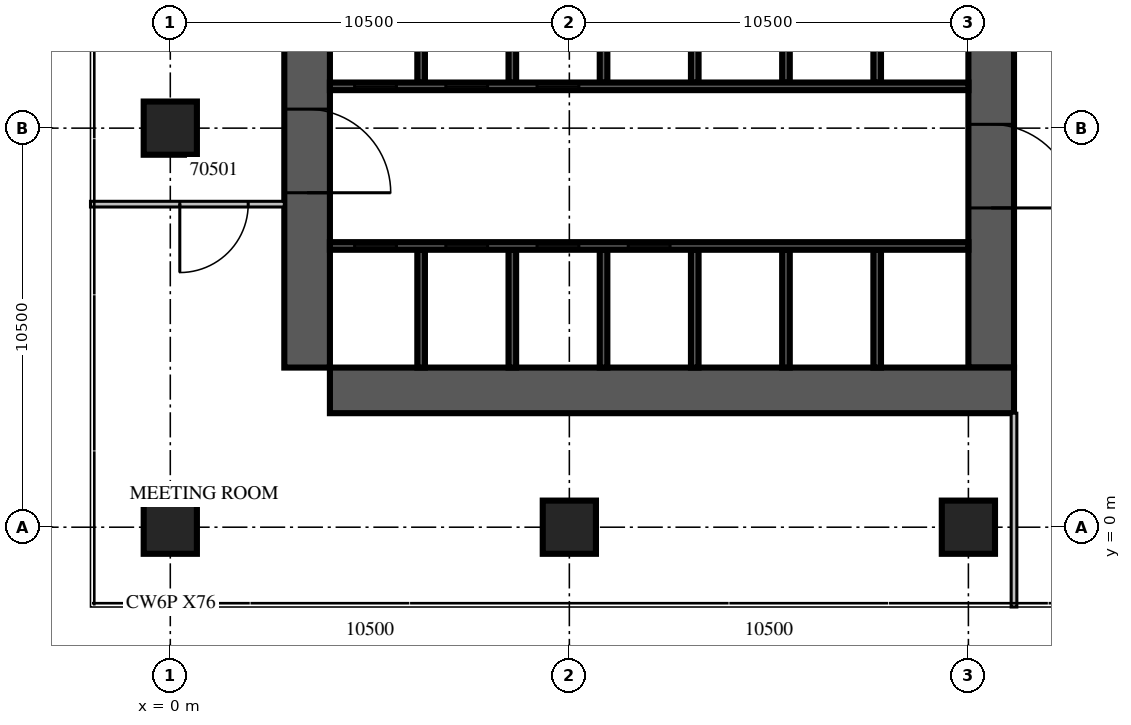
"""IFC4 building model, lengths in metres.
Left out: names, types, materials, properties, quantities, classifications, styles, units other than length and angle.
Written with IfcOpenShell. Run it as: python <this file> out.ifc"""

import sys

from ifc_helpers import new_model, si_unit, direction, frame, frame_2d, origin, origin_2d, place, context, subcontext, project, spatial, rectangle, extrude, source, transform, mapped, element, fill, save


model = new_model("IFC4")
c1 = context("Model", 3, precision=1e-05, world=origin(), true_north=direction((0.0, 1.0)))
c2 = subcontext(c1, "Body", "Model", "MODEL_VIEW")
j1 = project(units=[si_unit("LENGTHUNIT", "METRE"), si_unit("PLANEANGLEUNIT", "RADIAN")], contexts=[c1])
p1 = place(None, origin())
s1 = spatial("IfcSite", under=j1, at=p1, CompositionType="ELEMENT")
p2 = place(p1, origin())
s2 = spatial("IfcBuilding", under=s1, at=p2, CompositionType="ELEMENT")
p3 = place(p2, frame((0.0, 0.0, 12.9)))
s3 = spatial("IfcBuildingStorey", under=s2, at=p3, CompositionType="ELEMENT", Elevation=12.9)
m1 = source(origin(), c2, "Body", "SweptSolid", [
    extrude(rectangle(XDim=1.4, YDim=1.4, at=origin_2d()), origin(), (0.0, 0.0, 1.0), 5.4),
])
for number, where, z_axis, x_axis in (
    (1, (0.0, 0.0, 0.0), (0.0, 0.0, 1.0), (1.0, 0.0, 0.0)),
    (2, (0.0, 10.5, 0.0), (0.0, 0.0, 1.0), (1.0, 0.0, 0.0)),
    (3, (10.5, 0.0, 0.0), (0.0, 0.0, 1.0), (1.0, 0.0, 0.0)),
    (4, (21.0, 0.0, 0.0), (0.0, 0.0, 1.0), (1.0, 0.0, 0.0)),
):
    element("IfcColumn", number, at=place(p3, frame(where, z_axis=z_axis, x_axis=x_axis)), inside=s3, PredefinedType="COLUMN", context=c2, shape_type="MappedRepresentation", body=[
        mapped(m1, transform((0.0, 0.0, 0.0), scale=1.0)),
    ])
m2 = source(origin(), c2, "Body", "SweptSolid", [
    extrude(rectangle(XDim=18.0, YDim=1.2, at=frame_2d((9.0, 0.0))), origin(), (0.0, 0.0, 1.0), 5.4),
])
p4 = place(p3, frame((3.6, 4.2, 0.0), z_axis=(0.0, 0.0, 1.0), x_axis=(0.0, 1.0, 0.0)))
e5 = element("IfcWall", 5, at=p4, inside=s3, PredefinedType="SHEAR", context=c2, shape_type="MappedRepresentation", body=[
    mapped(m2, transform((0.0, 0.0, 0.0), scale=1.0)),
])
m3 = source(origin(), c2, "Body", "SweptSolid", [
    extrude(rectangle(XDim=2.2, YDim=2.1, at=frame_2d((1.1, 1.05))), frame((0.0, 0.61, 0.0), z_axis=(0.0, -1.0, 0.0), x_axis=(1.0, 0.0, 0.0)), (0.0, 0.0, 1.0), 1.22),
])
p5 = place(p4, frame((4.6, 0.0, 0.0)))
e6 = element("IfcOpeningElement", 6, at=p5, cuts=e5, PredefinedType="OPENING", context=c2, shape_type="MappedRepresentation", body=[
    mapped(m3, transform((0.0, 0.0, 0.0), scale=1.0)),
])
m4 = source(origin(), c2, "Body", "SweptSolid", [
    extrude(rectangle(XDim=16.8, YDim=1.2, at=frame_2d((8.4, 0.0))), origin(), (0.0, 0.0, 1.0), 5.4),
])
p6 = place(p3, frame((21.6, 4.2, 0.0), z_axis=(0.0, 0.0, 1.0), x_axis=(0.0, 1.0, 0.0)))
e7 = element("IfcWall", 7, at=p6, inside=s3, PredefinedType="SHEAR", context=c2, shape_type="MappedRepresentation", body=[
    mapped(m4, transform((0.0, 0.0, 0.0), scale=1.0)),
])
p7 = place(p6, frame((4.2, 0.0, 0.0)))
e8 = element("IfcOpeningElement", 8, at=p7, cuts=e7, PredefinedType="OPENING", context=c2, shape_type="MappedRepresentation", body=[
    mapped(m3, transform((0.0, 0.0, 0.0), scale=1.0)),
])
m5 = source(origin(), c2, "Body", "SweptSolid", [
    extrude(rectangle(XDim=1.2, YDim=2.1, at=frame_2d((0.6, 1.05))), frame((0.0, 0.61, 0.0), z_axis=(0.0, -1.0, 0.0), x_axis=(1.0, 0.0, 0.0)), (0.0, 0.0, 1.0), 1.22),
])
p8 = place(p6, frame((14.7, 0.0, 0.0)))
e9 = element("IfcOpeningElement", 9, at=p8, cuts=e7, PredefinedType="OPENING", context=c2, shape_type="MappedRepresentation", body=[
    mapped(m5, transform((0.0, 0.0, 0.0), scale=1.0)),
])
p9 = place(p3, frame((4.2, 3.6, 0.0), z_axis=(0.0, 0.0, 1.0), x_axis=(1.0, 0.0, 0.0)))
e10 = element("IfcWall", 10, at=p9, inside=s3, PredefinedType="SHEAR", context=c2, shape_type="MappedRepresentation", body=[
    mapped(m2, transform((0.0, 0.0, 0.0), scale=1.0)),
])
m6 = source(origin(), c2, "Body", "SweptSolid", [
    extrude(rectangle(XDim=3.1, YDim=0.2, at=frame_2d((1.55, 0.0))), origin(), (0.0, 0.0, 1.0), 5.4),
])
for number, where, z_axis, x_axis in (
    (11, (6.6, 4.2, 0.0), (0.0, 0.0, 1.0), (0.0, 1.0, 0.0)),
    (12, (9.0, 4.2, 0.0), (0.0, 0.0, 1.0), (0.0, 1.0, 0.0)),
    (13, (11.4, 4.2, 0.0), (0.0, 0.0, 1.0), (0.0, 1.0, 0.0)),
    (14, (13.8, 4.2, 0.0), (0.0, 0.0, 1.0), (0.0, 1.0, 0.0)),
    (15, (16.2, 4.2, 0.0), (0.0, 0.0, 1.0), (0.0, 1.0, 0.0)),
    (16, (18.6, 4.2, 0.0), (0.0, 0.0, 1.0), (0.0, 1.0, 0.0)),
):
    element("IfcWall", number, at=place(p3, frame(where, z_axis=z_axis, x_axis=x_axis)), inside=s3, PredefinedType="SOLIDWALL", context=c2, shape_type="MappedRepresentation", body=[
        mapped(m6, transform((0.0, 0.0, 0.0), scale=1.0)),
    ])
m7 = source(origin(), c2, "Body", "SweptSolid", [
    extrude(rectangle(XDim=3.0, YDim=0.2, at=frame_2d((1.5, 0.0))), origin(), (0.0, 0.0, 1.0), 5.4),
])
for number, where, z_axis, x_axis in (
    (17, (6.6, 11.7, 0.0), (0.0, 0.0, 1.0), (0.0, 1.0, 0.0)),
    (18, (9.0, 11.7, 0.0), (0.0, 0.0, 1.0), (0.0, 1.0, 0.0)),
    (19, (11.4, 11.7, 0.0), (0.0, 0.0, 1.0), (0.0, 1.0, 0.0)),
    (20, (13.8, 11.7, 0.0), (0.0, 0.0, 1.0), (0.0, 1.0, 0.0)),
    (21, (16.2, 11.7, 0.0), (0.0, 0.0, 1.0), (0.0, 1.0, 0.0)),
    (22, (18.6, 11.7, 0.0), (0.0, 0.0, 1.0), (0.0, 1.0, 0.0)),
):
    element("IfcWall", number, at=place(p3, frame(where, z_axis=z_axis, x_axis=x_axis)), inside=s3, PredefinedType="SOLIDWALL", context=c2, shape_type="MappedRepresentation", body=[
        mapped(m7, transform((0.0, 0.0, 0.0), scale=1.0)),
    ])
m8 = source(origin(), c2, "Body", "SweptSolid", [
    extrude(rectangle(XDim=16.8, YDim=0.2, at=frame_2d((8.4, 0.0))), origin(), (0.0, 0.0, 1.0), 5.4),
])
p10 = place(p3, frame((4.2, 7.4, 0.0), z_axis=(0.0, 0.0, 1.0), x_axis=(1.0, 0.0, 0.0)))
e23 = element("IfcWall", 23, at=p10, inside=s3, PredefinedType="SOLIDWALL", context=c2, shape_type="MappedRepresentation", body=[
    mapped(m8, transform((0.0, 0.0, 0.0), scale=1.0)),
])
m9 = source(origin(), c2, "Body", "SweptSolid", [
    extrude(rectangle(XDim=1.1, YDim=2.1, at=frame_2d((0.55, 1.05))), frame((0.0, 0.11, 0.0), z_axis=(0.0, -1.0, 0.0), x_axis=(1.0, 0.0, 0.0)), (0.0, 0.0, 1.0), 0.22),
])
p11 = place(p10, frame((0.65, 0.0, 0.0)))
e24 = element("IfcOpeningElement", 24, at=p11, cuts=e23, PredefinedType="OPENING", context=c2, shape_type="MappedRepresentation", body=[
    mapped(m9, transform((0.0, 0.0, 0.0), scale=1.0)),
])
p12 = place(p10, frame((3.05, 0.0, 0.0)))
e25 = element("IfcOpeningElement", 25, at=p12, cuts=e23, PredefinedType="OPENING", context=c2, shape_type="MappedRepresentation", body=[
    mapped(m9, transform((0.0, 0.0, 0.0), scale=1.0)),
])
p13 = place(p10, frame((5.45, 0.0, 0.0)))
e26 = element("IfcOpeningElement", 26, at=p13, cuts=e23, PredefinedType="OPENING", context=c2, shape_type="MappedRepresentation", body=[
    mapped(m9, transform((0.0, 0.0, 0.0), scale=1.0)),
])
p14 = place(p10, frame((7.85, 0.0, 0.0)))
e27 = element("IfcOpeningElement", 27, at=p14, cuts=e23, PredefinedType="OPENING", context=c2, shape_type="MappedRepresentation", body=[
    mapped(m9, transform((0.0, 0.0, 0.0), scale=1.0)),
])
p15 = place(p3, frame((4.2, 11.6, 0.0), z_axis=(0.0, 0.0, 1.0), x_axis=(1.0, 0.0, 0.0)))
e28 = element("IfcWall", 28, at=p15, inside=s3, PredefinedType="SOLIDWALL", context=c2, shape_type="MappedRepresentation", body=[
    mapped(m8, transform((0.0, 0.0, 0.0), scale=1.0)),
])
p16 = place(p15, frame((0.65, 0.0, 0.0)))
e29 = element("IfcOpeningElement", 29, at=p16, cuts=e28, PredefinedType="OPENING", context=c2, shape_type="MappedRepresentation", body=[
    mapped(m9, transform((0.0, 0.0, 0.0), scale=1.0)),
])
p17 = place(p15, frame((3.05, 0.0, 0.0)))
e30 = element("IfcOpeningElement", 30, at=p17, cuts=e28, PredefinedType="OPENING", context=c2, shape_type="MappedRepresentation", body=[
    mapped(m9, transform((0.0, 0.0, 0.0), scale=1.0)),
])
p18 = place(p15, frame((5.45, 0.0, 0.0)))
e31 = element("IfcOpeningElement", 31, at=p18, cuts=e28, PredefinedType="OPENING", context=c2, shape_type="MappedRepresentation", body=[
    mapped(m9, transform((0.0, 0.0, 0.0), scale=1.0)),
])
m10 = source(origin(), c2, "Body", "SweptSolid", [
    extrude(rectangle(XDim=5.1, YDim=0.15, at=frame_2d((2.55, 0.0))), origin(), (0.0, 0.0, 1.0), 4.8),
])
p19 = place(p3, frame((-2.1, 8.5, 0.0), z_axis=(0.0, 0.0, 1.0), x_axis=(1.0, 0.0, 0.0)))
e32 = element("IfcWall", 32, at=p19, inside=s3, PredefinedType="PARTITIONING", context=c2, shape_type="MappedRepresentation", body=[
    mapped(m10, transform((0.0, 0.0, 0.0), scale=1.0)),
])
m11 = source(origin(), c2, "Body", "SweptSolid", [
    extrude(rectangle(XDim=1.8, YDim=2.1, at=frame_2d((0.9, 1.05))), frame((0.0, 0.085, 0.0), z_axis=(0.0, -1.0, 0.0), x_axis=(1.0, 0.0, 0.0)), (0.0, 0.0, 1.0), 0.17),
])
p20 = place(p19, frame((2.35, 0.0, 0.0)))
e33 = element("IfcOpeningElement", 33, at=p20, cuts=e32, PredefinedType="OPENING", context=c2, shape_type="MappedRepresentation", body=[
    mapped(m11, transform((0.0, 0.0, 0.0), scale=1.0)),
])
p21 = place(p3, frame((22.2, -2.1, 0.0), z_axis=(0.0, 0.0, 1.0), x_axis=(0.0, 1.0, 0.0)))
e34 = element("IfcWall", 34, at=p21, inside=s3, PredefinedType="PARTITIONING", context=c2, shape_type="MappedRepresentation", body=[
    mapped(m10, transform((0.0, 0.0, 0.0), scale=1.0)),
])
m12 = source(origin(), c2, "Body", "SweptSolid", [
    extrude(rectangle(XDim=1.1, YDim=2.1, at=frame_2d((0.55, 1.05))), frame((0.0, 0.025, 0.0), z_axis=(0.0, -1.0, 0.0), x_axis=(1.0, 0.0, 0.0)), (0.0, 0.0, 1.0), 0.05),
])
p22 = place(p11, origin())
e35 = element("IfcDoor", 35, at=p22, inside=s3, OperationType="SLIDING_TO_LEFT", PredefinedType="DOOR", context=c2, shape_type="MappedRepresentation", body=[
    mapped(m12, transform((0.0, 0.0, 0.0), scale=1.0)),
])
fill(e24, e35)
p23 = place(p12, origin())
e36 = element("IfcDoor", 36, at=p23, inside=s3, OperationType="SLIDING_TO_LEFT", PredefinedType="DOOR", context=c2, shape_type="MappedRepresentation", body=[
    mapped(m12, transform((0.0, 0.0, 0.0), scale=1.0)),
])
fill(e25, e36)
p24 = place(p13, origin())
e37 = element("IfcDoor", 37, at=p24, inside=s3, OperationType="SLIDING_TO_LEFT", PredefinedType="DOOR", context=c2, shape_type="MappedRepresentation", body=[
    mapped(m12, transform((0.0, 0.0, 0.0), scale=1.0)),
])
fill(e26, e37)
p25 = place(p14, origin())
e38 = element("IfcDoor", 38, at=p25, inside=s3, OperationType="SLIDING_TO_LEFT", PredefinedType="DOOR", context=c2, shape_type="MappedRepresentation", body=[
    mapped(m12, transform((0.0, 0.0, 0.0), scale=1.0)),
])
fill(e27, e38)
p26 = place(p16, origin())
e39 = element("IfcDoor", 39, at=p26, inside=s3, OperationType="SLIDING_TO_LEFT", PredefinedType="DOOR", context=c2, shape_type="MappedRepresentation", body=[
    mapped(m12, transform((0.0, 0.0, 0.0), scale=1.0)),
])
fill(e29, e39)
p27 = place(p17, origin())
e40 = element("IfcDoor", 40, at=p27, inside=s3, OperationType="SLIDING_TO_LEFT", PredefinedType="DOOR", context=c2, shape_type="MappedRepresentation", body=[
    mapped(m12, transform((0.0, 0.0, 0.0), scale=1.0)),
])
fill(e30, e40)
p28 = place(p18, origin())
e41 = element("IfcDoor", 41, at=p28, inside=s3, OperationType="SLIDING_TO_LEFT", PredefinedType="DOOR", context=c2, shape_type="MappedRepresentation", body=[
    mapped(m12, transform((0.0, 0.0, 0.0), scale=1.0)),
])
fill(e31, e41)
m13 = source(origin(), c2, "Body", "SweptSolid", [
    extrude(rectangle(XDim=2.2, YDim=2.1, at=frame_2d((1.1, 1.05))), frame((0.0, 0.025, 0.0), z_axis=(0.0, -1.0, 0.0), x_axis=(1.0, 0.0, 0.0)), (0.0, 0.0, 1.0), 0.05),
])
p29 = place(p7, origin())
e42 = element("IfcDoor", 42, at=p29, inside=s3, OperationType="DOUBLE_DOOR_SINGLE_SWING", PredefinedType="DOOR", context=c2, shape_type="MappedRepresentation", body=[
    mapped(m13, transform((0.0, 0.0, 0.0), scale=1.0)),
])
fill(e8, e42)
p30 = place(p5, origin())
e43 = element("IfcDoor", 43, at=p30, inside=s3, OperationType="DOUBLE_DOOR_SINGLE_SWING", PredefinedType="DOOR", context=c2, shape_type="MappedRepresentation", body=[
    mapped(m13, transform((0.0, 0.0, 0.0), scale=1.0)),
])
fill(e6, e43)
m14 = source(origin(), c2, "Body", "SweptSolid", [
    extrude(rectangle(XDim=1.8, YDim=2.1, at=frame_2d((0.9, 1.05))), frame((0.0, 0.025, 0.0), z_axis=(0.0, -1.0, 0.0), x_axis=(1.0, 0.0, 0.0)), (0.0, 0.0, 1.0), 0.05),
])
p31 = place(p20, origin())
e44 = element("IfcDoor", 44, at=p31, inside=s3, OperationType="DOUBLE_DOOR_SINGLE_SWING", PredefinedType="DOOR", context=c2, shape_type="MappedRepresentation", body=[
    mapped(m14, transform((0.0, 0.0, 0.0), scale=1.0)),
])
fill(e33, e44)
save(model, sys.argv[1])
